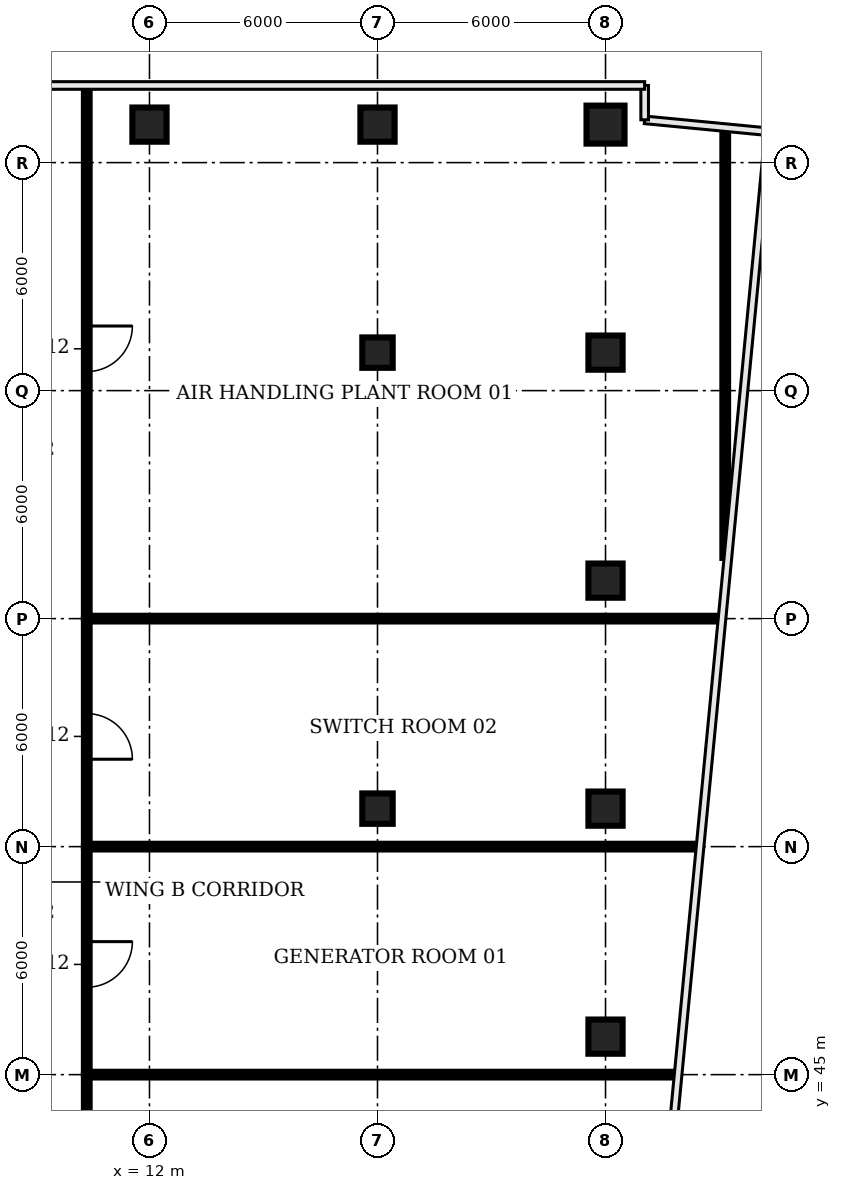
"""IFC4 building model, lengths in metres.
Left out: names, types, materials, properties, quantities, classifications, styles, units other than length and angle.
Written with IfcOpenShell. Run it as: python <this file> out.ifc"""

import sys

from ifc_helpers import new_model, si_unit, direction, frame, frame_2d, origin, origin_2d, place, context, subcontext, project, spatial, rectangle, circle, extrude, element, fill, save


model = new_model("IFC4")
c1 = context("Model", 3, precision=1e-05, world=origin(), true_north=direction((0.0, 1.0)))
c2 = subcontext(c1, "Body", "Model", "MODEL_VIEW")
j1 = project(units=[si_unit("LENGTHUNIT", "METRE"), si_unit("PLANEANGLEUNIT", "RADIAN")], contexts=[c1])
p1 = place(None, origin())
s1 = spatial("IfcSite", under=j1, at=p1, CompositionType="ELEMENT")
p2 = place(p1, origin())
s2 = spatial("IfcBuilding", under=s1, at=p2, CompositionType="ELEMENT")
p3 = place(p2, frame((0.0, 0.0, 251.6)))
s3 = spatial("IfcBuildingStorey", under=s2, at=p3, CompositionType="ELEMENT", Elevation=251.6)
p4 = place(p3, frame((12.0, 70.0, 0.0), z_axis=(0.0, 0.0, 1.0), x_axis=(1.0, 0.0, 0.0)))
e1 = element("IfcColumn", 1, at=p4, inside=s3, PredefinedType="COLUMN", context=c2, shape_type="SweptSolid", body=[
    extrude(rectangle(XDim=0.9, YDim=0.9, at=origin_2d()), origin(), (0.0, 0.0, 1.0), 3.2),
])
for number, where, z_axis, x_axis in (
    (2, (18.0, 52.0, 0.0), (0.0, 0.0, 1.0), (1.0, 0.0, 0.0)),
    (3, (18.0, 64.0, 0.0), (0.0, 0.0, 1.0), (1.0, 0.0, 0.0)),
):
    element("IfcColumn", number, at=place(p3, frame(where, z_axis=z_axis, x_axis=x_axis)), inside=s3, PredefinedType="COLUMN", context=c2, shape_type="SweptSolid", body=[
        extrude(rectangle(XDim=0.8, YDim=0.8, at=origin_2d()), origin(), (0.0, 0.0, 1.0), 3.2),
    ])
for number, where, z_axis, x_axis in (
    (4, (18.0, 70.0, 0.0), (0.0, 0.0, 1.0), (1.0, 0.0, 0.0)),
    (5, (24.0, 46.0, 0.0), (0.0, 0.0, 1.0), (1.0, 0.0, 0.0)),
    (6, (24.0, 52.0, 0.0), (0.0, 0.0, 1.0), (1.0, 0.0, 0.0)),
    (7, (24.0, 58.0, 0.0), (0.0, 0.0, 1.0), (1.0, 0.0, 0.0)),
    (8, (24.0, 64.0, 0.0), (0.0, 0.0, 1.0), (1.0, 0.0, 0.0)),
):
    element("IfcColumn", number, at=place(p3, frame(where, z_axis=z_axis, x_axis=x_axis)), inside=s3, PredefinedType="COLUMN", context=c2, shape_type="SweptSolid", body=[
        extrude(rectangle(XDim=0.9, YDim=0.9, at=origin_2d()), origin(), (0.0, 0.0, 1.0), 3.2),
    ])
p5 = place(p3, frame((24.0, 70.0, 0.0), z_axis=(0.0, 0.0, 1.0), x_axis=(1.0, 0.0, 0.0)))
e9 = element("IfcColumn", 9, at=p5, inside=s3, PredefinedType="COLUMN", context=c2, shape_type="SweptSolid", body=[
    extrude(circle(Radius=0.5, at=origin_2d()), origin(), (0.0, 0.0, 1.0), 3.2),
])
p6 = place(p3, frame((10.35, 45.0, 0.0), z_axis=(0.0, 0.0, 1.0), x_axis=(0.0, -1.0, 0.0)))
e10 = element("IfcWall", 10, at=p6, inside=s3, PredefinedType="PARTITIONING", context=c2, shape_type="SweptSolid", body=[
    extrude(rectangle(XDim=11.05, YDim=0.15, at=frame_2d((5.525, 0.0))), origin(), (0.0, 0.0, 1.0), 2.83),
])
p7 = place(p6, frame((6.95, 0.0, 0.0)))
e11 = element("IfcOpeningElement", 11, at=p7, cuts=e10, PredefinedType="OPENING", context=c2, shape_type="SweptSolid", body=[
    extrude(rectangle(XDim=1.2, YDim=2.1, at=frame_2d((0.6, 1.05))), frame((0.0, 0.085, 0.0), z_axis=(0.0, -1.0, 0.0), x_axis=(1.0, 0.0, 0.0)), (0.0, 0.0, 1.0), 0.17),
])
p8 = place(p3, frame((10.35, 45.0, 0.0), z_axis=(0.0, 0.0, 1.0), x_axis=(1.0, 0.0, 0.0)))
e12 = element("IfcWall", 12, at=p8, inside=s3, PredefinedType="PARTITIONING", context=c2, shape_type="SweptSolid", body=[
    extrude(rectangle(XDim=15.51, YDim=0.15, at=frame_2d((7.755, 0.0))), origin(), (0.0, 0.0, 1.0), 2.83),
])
p9 = place(p3, frame((10.35, 51.0, 0.0), z_axis=(0.0, 0.0, 1.0), x_axis=(0.0, -1.0, 0.0)))
e13 = element("IfcWall", 13, at=p9, inside=s3, PredefinedType="PARTITIONING", context=c2, shape_type="SweptSolid", body=[
    extrude(rectangle(XDim=6.0, YDim=0.15, at=frame_2d((3.0, 0.0))), origin(), (0.0, 0.0, 1.0), 2.83),
])
p10 = place(p9, frame((2.5, 0.0, 0.0)))
e14 = element("IfcOpeningElement", 14, at=p10, cuts=e13, PredefinedType="OPENING", context=c2, shape_type="SweptSolid", body=[
    extrude(rectangle(XDim=1.2, YDim=2.1, at=frame_2d((0.6, 1.05))), frame((0.0, 0.085, 0.0), z_axis=(0.0, -1.0, 0.0), x_axis=(1.0, 0.0, 0.0)), (0.0, 0.0, 1.0), 0.17),
])
p11 = place(p3, frame((10.35, 51.0, 0.0), z_axis=(0.0, 0.0, 1.0), x_axis=(1.0, 0.0, 0.0)))
e15 = element("IfcWall", 15, at=p11, inside=s3, PredefinedType="PARTITIONING", context=c2, shape_type="SweptSolid", body=[
    extrude(rectangle(XDim=16.09, YDim=0.15, at=frame_2d((8.045, 0.0))), origin(), (0.0, 0.0, 1.0), 2.83),
])
p12 = place(p3, frame((10.35, 57.0, 0.0), z_axis=(0.0, 0.0, 1.0), x_axis=(0.0, -1.0, 0.0)))
e16 = element("IfcWall", 16, at=p12, inside=s3, PredefinedType="PARTITIONING", context=c2, shape_type="SweptSolid", body=[
    extrude(rectangle(XDim=6.0, YDim=0.15, at=frame_2d((3.0, 0.0))), origin(), (0.0, 0.0, 1.0), 2.83),
])
p13 = place(p12, frame((2.5, 0.0, 0.0)))
e17 = element("IfcOpeningElement", 17, at=p13, cuts=e16, PredefinedType="OPENING", context=c2, shape_type="SweptSolid", body=[
    extrude(rectangle(XDim=1.2, YDim=2.1, at=frame_2d((0.6, 1.05))), frame((0.0, 0.085, 0.0), z_axis=(0.0, -1.0, 0.0), x_axis=(1.0, 0.0, 0.0)), (0.0, 0.0, 1.0), 0.17),
])
p14 = place(p3, frame((10.35, 57.0, 0.0), z_axis=(0.0, 0.0, 1.0), x_axis=(1.0, 0.0, 0.0)))
e18 = element("IfcWall", 18, at=p14, inside=s3, PredefinedType="PARTITIONING", context=c2, shape_type="SweptSolid", body=[
    extrude(rectangle(XDim=16.67, YDim=0.15, at=frame_2d((8.335, 0.0))), origin(), (0.0, 0.0, 1.0), 2.83),
])
p15 = place(p3, frame((10.35, 70.98, 0.0), z_axis=(0.0, 0.0, 1.0), x_axis=(0.0, -1.0, 0.0)))
e19 = element("IfcWall", 19, at=p15, inside=s3, PredefinedType="PARTITIONING", context=c2, shape_type="SweptSolid", body=[
    extrude(rectangle(XDim=13.98, YDim=0.15, at=frame_2d((6.99, 0.0))), origin(), (0.0, 0.0, 1.0), 2.83),
])
p16 = place(p15, frame((6.28, 0.0, 0.0)))
e20 = element("IfcOpeningElement", 20, at=p16, cuts=e19, PredefinedType="OPENING", context=c2, shape_type="SweptSolid", body=[
    extrude(rectangle(XDim=1.2, YDim=2.1, at=frame_2d((0.6, 1.05))), frame((0.0, 0.085, 0.0), z_axis=(0.0, -1.0, 0.0), x_axis=(1.0, 0.0, 0.0)), (0.0, 0.0, 1.0), 0.17),
])
p17 = place(p3, frame((27.15, 58.598, 0.0), z_axis=(0.0, 0.0, 1.0), x_axis=(0.0, 1.0, 0.0)))
e21 = element("IfcWall", 21, at=p17, inside=s3, PredefinedType="PARTITIONING", context=c2, shape_type="SweptSolid", body=[
    extrude(rectangle(XDim=11.272, YDim=0.15, at=frame_2d((5.636, 0.0))), origin(), (0.0, 0.0, 1.0), 2.83),
])
p18 = place(p10, origin())
e22 = element("IfcDoor", 22, at=p18, inside=s3, OperationType="SINGLE_SWING_LEFT", PredefinedType="DOOR", context=c2, shape_type="SweptSolid", body=[
    extrude(rectangle(XDim=1.2, YDim=2.1, at=frame_2d((0.6, 1.05))), frame((0.0, 0.025, 0.0), z_axis=(0.0, -1.0, 0.0), x_axis=(1.0, 0.0, 0.0)), (0.0, 0.0, 1.0), 0.05),
])
fill(e14, e22)
p19 = place(p13, origin())
e23 = element("IfcDoor", 23, at=p19, inside=s3, OperationType="SINGLE_SWING_RIGHT", PredefinedType="DOOR", context=c2, shape_type="SweptSolid", body=[
    extrude(rectangle(XDim=1.2, YDim=2.1, at=frame_2d((0.6, 1.05))), frame((0.0, 0.025, 0.0), z_axis=(0.0, -1.0, 0.0), x_axis=(1.0, 0.0, 0.0)), (0.0, 0.0, 1.0), 0.05),
])
fill(e17, e23)
p20 = place(p16, origin())
e24 = element("IfcDoor", 24, at=p20, inside=s3, OperationType="SINGLE_SWING_LEFT", PredefinedType="DOOR", context=c2, shape_type="SweptSolid", body=[
    extrude(rectangle(XDim=1.2, YDim=2.1, at=frame_2d((0.6, 1.05))), frame((0.0, 0.025, 0.0), z_axis=(0.0, -1.0, 0.0), x_axis=(1.0, 0.0, 0.0)), (0.0, 0.0, 1.0), 0.05),
])
fill(e20, e24)
save(model, sys.argv[1])
